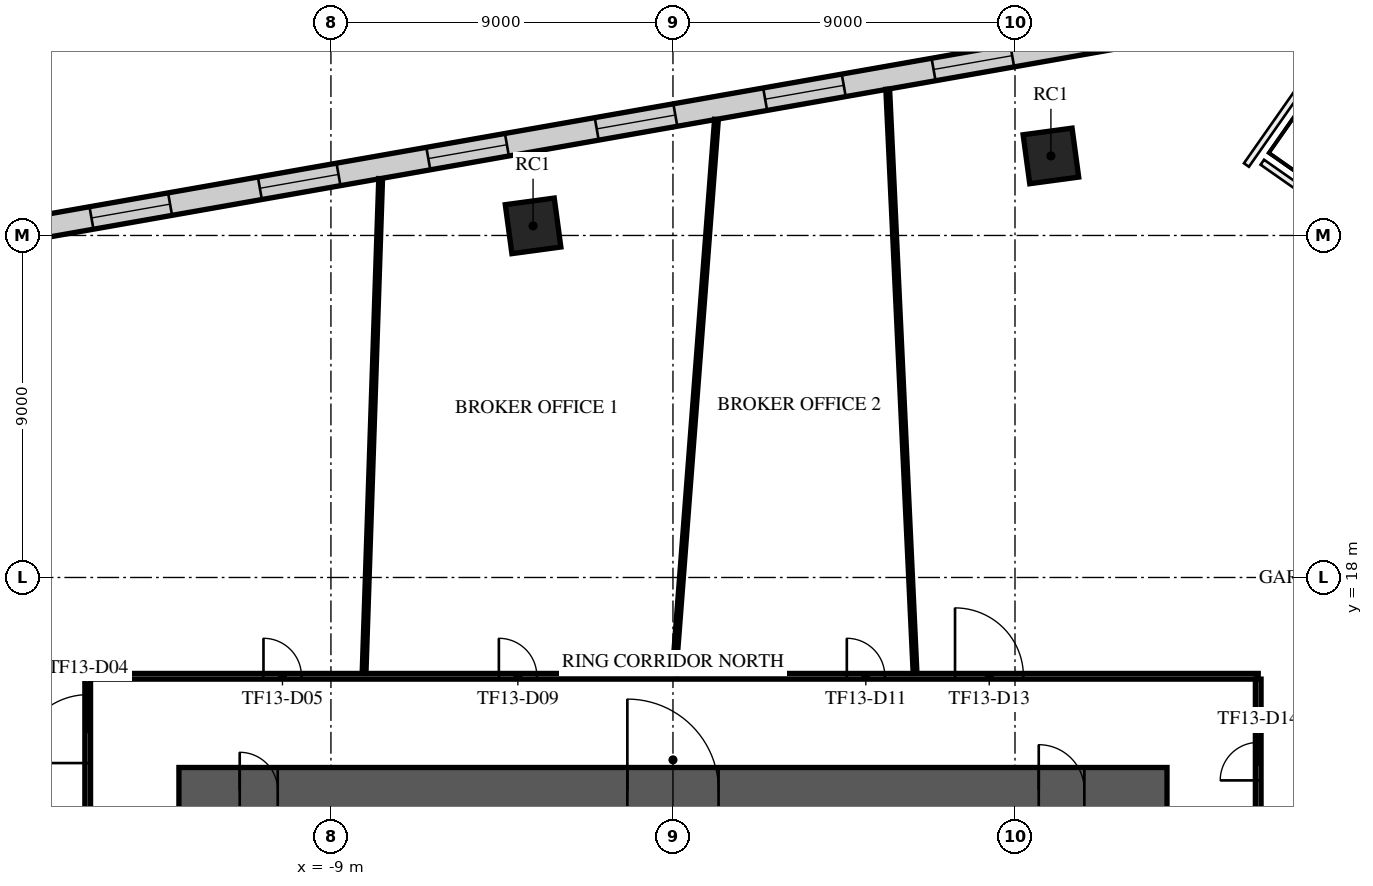
"""IFC4 building model, lengths in metres.
Left out: names, types, materials, properties, quantities, classifications, styles, units other than length and angle.
Written with IfcOpenShell. Run it as: python <this file> out.ifc"""

import sys

from ifc_helpers import new_model, si_unit, direction, frame, frame_2d, origin, origin_2d, place, context, subcontext, project, spatial, rectangle, extrude, element, fill, save


model = new_model("IFC4")
c1 = context("Model", 3, precision=1e-05, world=origin(), true_north=direction((0.0, 1.0)))
c2 = subcontext(c1, "Body", "Model", "MODEL_VIEW")
j1 = project(units=[si_unit("LENGTHUNIT", "METRE"), si_unit("PLANEANGLEUNIT", "RADIAN")], contexts=[c1])
p1 = place(None, origin())
s1 = spatial("IfcSite", under=j1, at=p1, CompositionType="ELEMENT")
p2 = place(p1, origin())
s2 = spatial("IfcBuilding", under=s1, at=p2, CompositionType="ELEMENT")
p3 = place(p2, frame((0.0, 0.0, 59.7)))
s3 = spatial("IfcBuildingStorey", under=s2, at=p3, CompositionType="ELEMENT", Elevation=59.7)
for number, where, z_axis, x_axis in (
    (1, (9.945, 29.093, 0.0), (0.0, 0.0, 1.0), (0.991, 0.134, 0.0)),
    (2, (-3.681, 27.253, 0.0), (0.0, 0.0, 1.0), (0.991, 0.134, 0.0)),
):
    element("IfcColumn", number, at=place(p3, frame(where, z_axis=z_axis, x_axis=x_axis)), inside=s3, PredefinedType="COLUMN", context=c2, shape_type="SweptSolid", body=[
        extrude(rectangle(XDim=1.3, YDim=1.3, at=origin_2d()), origin(), (0.0, 0.0, 1.0), 4.2),
    ])
p4 = place(p3, frame((-13.0, 12.4, 0.0), z_axis=(0.0, 0.0, 1.0), x_axis=(1.0, 0.0, 0.0)))
e3 = element("IfcWall", 3, at=p4, inside=s3, PredefinedType="SHEAR", context=c2, shape_type="SweptSolid", body=[
    extrude(rectangle(XDim=26.0, YDim=1.2, at=frame_2d((13.0, 0.0))), origin(), (0.0, 0.0, 1.0), 3.75),
])
p5 = place(p4, frame((11.8, 0.0, 0.0)))
e4 = element("IfcOpeningElement", 4, at=p5, cuts=e3, PredefinedType="OPENING", context=c2, shape_type="SweptSolid", body=[
    extrude(rectangle(XDim=2.4, YDim=2.4, at=frame_2d((1.2, 1.2))), frame((0.0, 0.61, 0.0), z_axis=(0.0, -1.0, 0.0), x_axis=(1.0, 0.0, 0.0)), (0.0, 0.0, 1.0), 1.22),
])
p6 = place(p4, frame((22.625, 0.0, 0.0)))
e5 = element("IfcOpeningElement", 5, at=p6, cuts=e3, PredefinedType="OPENING", context=c2, shape_type="SweptSolid", body=[
    extrude(rectangle(XDim=1.2, YDim=2.1, at=frame_2d((0.6, 1.05))), frame((0.0, 0.61, 0.0), z_axis=(0.0, -1.0, 0.0), x_axis=(1.0, 0.0, 0.0)), (0.0, 0.0, 1.0), 1.22),
])
p7 = place(p4, frame((1.6, 0.0, 0.0)))
e6 = element("IfcOpeningElement", 6, at=p7, cuts=e3, PredefinedType="OPENING", context=c2, shape_type="SweptSolid", body=[
    extrude(rectangle(XDim=1.0, YDim=2.1, at=frame_2d((0.5, 1.05))), frame((0.0, 0.61, 0.0), z_axis=(0.0, -1.0, 0.0), x_axis=(1.0, 0.0, 0.0)), (0.0, 0.0, 1.0), 1.22),
])
p8 = place(p3, frame((18.97, 33.503, 0.0), z_axis=(0.0, 0.0, 1.0), x_axis=(-0.984807939945, -0.173647117517, 0.0)))
e7 = element("IfcWall", 7, at=p8, inside=s3, PredefinedType="STANDARD", context=c2, shape_type="SweptSolid", body=[
    extrude(rectangle(XDim=49.376, YDim=0.6, at=frame_2d((24.688, 0.0))), origin(), (0.0, 0.0, 1.0), 3.75),
])
p9 = place(p8, frame((1.2, 0.0, 0.9)))
e8 = element("IfcOpeningElement", 8, at=p9, cuts=e7, PredefinedType="OPENING", context=c2, shape_type="SweptSolid", body=[
    extrude(rectangle(XDim=2.1, YDim=2.1, at=frame_2d((1.05, 1.05))), frame((0.0, 0.31, 0.0), z_axis=(0.0, -1.0, 0.0), x_axis=(1.0, 0.0, 0.0)), (0.0, 0.0, 1.0), 0.62),
])
p10 = place(p8, frame((5.7, 0.0, 0.9)))
e9 = element("IfcOpeningElement", 9, at=p10, cuts=e7, PredefinedType="OPENING", context=c2, shape_type="SweptSolid", body=[
    extrude(rectangle(XDim=2.1, YDim=2.1, at=frame_2d((1.05, 1.05))), frame((0.0, 0.31, 0.0), z_axis=(0.0, -1.0, 0.0), x_axis=(1.0, 0.0, 0.0)), (0.0, 0.0, 1.0), 0.62),
])
p11 = place(p8, frame((10.2, 0.0, 0.9)))
e10 = element("IfcOpeningElement", 10, at=p11, cuts=e7, PredefinedType="OPENING", context=c2, shape_type="SweptSolid", body=[
    extrude(rectangle(XDim=2.1, YDim=2.1, at=frame_2d((1.05, 1.05))), frame((0.0, 0.31, 0.0), z_axis=(0.0, -1.0, 0.0), x_axis=(1.0, 0.0, 0.0)), (0.0, 0.0, 1.0), 0.62),
])
p12 = place(p8, frame((14.7, 0.0, 0.9)))
e11 = element("IfcOpeningElement", 11, at=p12, cuts=e7, PredefinedType="OPENING", context=c2, shape_type="SweptSolid", body=[
    extrude(rectangle(XDim=2.1, YDim=2.1, at=frame_2d((1.05, 1.05))), frame((0.0, 0.31, 0.0), z_axis=(0.0, -1.0, 0.0), x_axis=(1.0, 0.0, 0.0)), (0.0, 0.0, 1.0), 0.62),
])
p13 = place(p8, frame((19.2, 0.0, 0.9)))
e12 = element("IfcOpeningElement", 12, at=p13, cuts=e7, PredefinedType="OPENING", context=c2, shape_type="SweptSolid", body=[
    extrude(rectangle(XDim=2.1, YDim=2.1, at=frame_2d((1.05, 1.05))), frame((0.0, 0.31, 0.0), z_axis=(0.0, -1.0, 0.0), x_axis=(1.0, 0.0, 0.0)), (0.0, 0.0, 1.0), 0.62),
])
p14 = place(p8, frame((23.7, 0.0, 0.9)))
e13 = element("IfcOpeningElement", 13, at=p14, cuts=e7, PredefinedType="OPENING", context=c2, shape_type="SweptSolid", body=[
    extrude(rectangle(XDim=2.1, YDim=2.1, at=frame_2d((1.05, 1.05))), frame((0.0, 0.31, 0.0), z_axis=(0.0, -1.0, 0.0), x_axis=(1.0, 0.0, 0.0)), (0.0, 0.0, 1.0), 0.62),
])
p15 = place(p8, frame((28.2, 0.0, 0.9)))
e14 = element("IfcOpeningElement", 14, at=p15, cuts=e7, PredefinedType="OPENING", context=c2, shape_type="SweptSolid", body=[
    extrude(rectangle(XDim=2.1, YDim=2.1, at=frame_2d((1.05, 1.05))), frame((0.0, 0.31, 0.0), z_axis=(0.0, -1.0, 0.0), x_axis=(1.0, 0.0, 0.0)), (0.0, 0.0, 1.0), 0.62),
])
p16 = place(p8, frame((32.7, 0.0, 0.9)))
e15 = element("IfcOpeningElement", 15, at=p16, cuts=e7, PredefinedType="OPENING", context=c2, shape_type="SweptSolid", body=[
    extrude(rectangle(XDim=2.1, YDim=2.1, at=frame_2d((1.05, 1.05))), frame((0.0, 0.31, 0.0), z_axis=(0.0, -1.0, 0.0), x_axis=(1.0, 0.0, 0.0)), (0.0, 0.0, 1.0), 0.62),
])
p17 = place(p8, frame((37.2, 0.0, 0.9)))
e16 = element("IfcOpeningElement", 16, at=p17, cuts=e7, PredefinedType="OPENING", context=c2, shape_type="SweptSolid", body=[
    extrude(rectangle(XDim=2.1, YDim=2.1, at=frame_2d((1.05, 1.05))), frame((0.0, 0.31, 0.0), z_axis=(0.0, -1.0, 0.0), x_axis=(1.0, 0.0, 0.0)), (0.0, 0.0, 1.0), 0.62),
])
p18 = place(p8, frame((41.7, 0.0, 0.9)))
e17 = element("IfcOpeningElement", 17, at=p18, cuts=e7, PredefinedType="OPENING", context=c2, shape_type="SweptSolid", body=[
    extrude(rectangle(XDim=2.1, YDim=2.1, at=frame_2d((1.05, 1.05))), frame((0.0, 0.31, 0.0), z_axis=(0.0, -1.0, 0.0), x_axis=(1.0, 0.0, 0.0)), (0.0, 0.0, 1.0), 0.62),
])
p19 = place(p8, frame((46.138, 0.0, 0.9)))
e18 = element("IfcOpeningElement", 18, at=p19, cuts=e7, PredefinedType="OPENING", context=c2, shape_type="SweptSolid", body=[
    extrude(rectangle(XDim=2.1, YDim=2.1, at=frame_2d((1.05, 1.05))), frame((0.0, 0.31, 0.0), z_axis=(0.0, -1.0, 0.0), x_axis=(1.0, 0.0, 0.0)), (0.0, 0.0, 1.0), 0.62),
])
p20 = place(p3, frame((-15.4, -15.4, 0.0), z_axis=(0.0, 0.0, 1.0), x_axis=(0.0, 1.0, 0.0)))
e19 = element("IfcWall", 19, at=p20, inside=s3, PredefinedType="PARTITIONING", context=c2, shape_type="SweptSolid", body=[
    extrude(rectangle(XDim=30.8, YDim=0.15, at=frame_2d((15.4, 0.0))), origin(), (0.0, 0.0, 1.0), 3.25),
])
p21 = place(p20, frame((21.408, 0.0, 0.0)))
e20 = element("IfcOpeningElement", 20, at=p21, cuts=e19, PredefinedType="OPENING", context=c2, shape_type="SweptSolid", body=[
    extrude(rectangle(XDim=1.8, YDim=2.1, at=frame_2d((0.9, 1.05))), frame((0.0, 0.085, 0.0), z_axis=(0.0, -1.0, 0.0), x_axis=(1.0, 0.0, 0.0)), (0.0, 0.0, 1.0), 0.17),
])
p22 = place(p20, frame((17.158, 0.0, 0.0)))
e21 = element("IfcOpeningElement", 21, at=p22, cuts=e19, PredefinedType="OPENING", context=c2, shape_type="SweptSolid", body=[
    extrude(rectangle(XDim=1.0, YDim=2.1, at=frame_2d((0.5, 1.05))), frame((0.0, 0.085, 0.0), z_axis=(0.0, -1.0, 0.0), x_axis=(1.0, 0.0, 0.0)), (0.0, 0.0, 1.0), 0.17),
])
p23 = place(p20, frame((8.316, 0.0, 0.0)))
e22 = element("IfcOpeningElement", 22, at=p23, cuts=e19, PredefinedType="OPENING", context=c2, shape_type="SweptSolid", body=[
    extrude(rectangle(XDim=1.0, YDim=2.1, at=frame_2d((0.5, 1.05))), frame((0.0, 0.085, 0.0), z_axis=(0.0, -1.0, 0.0), x_axis=(1.0, 0.0, 0.0)), (0.0, 0.0, 1.0), 0.17),
])
p24 = place(p20, frame((28.516, 0.0, 0.0)))
e23 = element("IfcOpeningElement", 23, at=p24, cuts=e19, PredefinedType="OPENING", context=c2, shape_type="SweptSolid", body=[
    extrude(rectangle(XDim=1.8, YDim=2.1, at=frame_2d((0.9, 1.05))), frame((0.0, 0.085, 0.0), z_axis=(0.0, -1.0, 0.0), x_axis=(1.0, 0.0, 0.0)), (0.0, 0.0, 1.0), 0.17),
])
p25 = place(p20, frame((2.8, 0.0, 0.0)))
e24 = element("IfcOpeningElement", 24, at=p25, cuts=e19, PredefinedType="OPENING", context=c2, shape_type="SweptSolid", body=[
    extrude(rectangle(XDim=1.0, YDim=2.1, at=frame_2d((0.5, 1.05))), frame((0.0, 0.085, 0.0), z_axis=(0.0, -1.0, 0.0), x_axis=(1.0, 0.0, 0.0)), (0.0, 0.0, 1.0), 0.17),
])
p26 = place(p3, frame((-15.325, 15.4, 0.0), z_axis=(0.0, 0.0, 1.0), x_axis=(1.0, 0.0, 0.0)))
e25 = element("IfcWall", 25, at=p26, inside=s3, PredefinedType="PARTITIONING", context=c2, shape_type="SweptSolid", body=[
    extrude(rectangle(XDim=30.725, YDim=0.15, at=frame_2d((15.362, 0.0))), origin(), (0.0, 0.0, 1.0), 3.25),
])
p27 = place(p26, frame((4.55, 0.0, 0.0)))
e26 = element("IfcOpeningElement", 26, at=p27, cuts=e25, PredefinedType="OPENING", context=c2, shape_type="SweptSolid", body=[
    extrude(rectangle(XDim=1.0, YDim=2.1, at=frame_2d((0.5, 1.05))), frame((0.0, 0.085, 0.0), z_axis=(0.0, -1.0, 0.0), x_axis=(1.0, 0.0, 0.0)), (0.0, 0.0, 1.0), 0.17),
])
p28 = place(p26, frame((10.744, 0.0, 0.0)))
e27 = element("IfcOpeningElement", 27, at=p28, cuts=e25, PredefinedType="OPENING", context=c2, shape_type="SweptSolid", body=[
    extrude(rectangle(XDim=1.0, YDim=2.1, at=frame_2d((0.5, 1.05))), frame((0.0, 0.085, 0.0), z_axis=(0.0, -1.0, 0.0), x_axis=(1.0, 0.0, 0.0)), (0.0, 0.0, 1.0), 0.17),
])
p29 = place(p26, frame((19.9, 0.0, 0.0)))
e28 = element("IfcOpeningElement", 28, at=p29, cuts=e25, PredefinedType="OPENING", context=c2, shape_type="SweptSolid", body=[
    extrude(rectangle(XDim=1.0, YDim=2.1, at=frame_2d((0.5, 1.05))), frame((0.0, 0.085, 0.0), z_axis=(0.0, -1.0, 0.0), x_axis=(1.0, 0.0, 0.0)), (0.0, 0.0, 1.0), 0.17),
])
p30 = place(p26, frame((22.747, 0.0, 0.0)))
e29 = element("IfcOpeningElement", 29, at=p30, cuts=e25, PredefinedType="OPENING", context=c2, shape_type="SweptSolid", body=[
    extrude(rectangle(XDim=1.8, YDim=2.1, at=frame_2d((0.9, 1.05))), frame((0.0, 0.085, 0.0), z_axis=(0.0, -1.0, 0.0), x_axis=(1.0, 0.0, 0.0)), (0.0, 0.0, 1.0), 0.17),
])
p31 = place(p3, frame((15.4, -15.325, 0.0), z_axis=(0.0, 0.0, 1.0), x_axis=(0.0, 1.0, 0.0)))
e30 = element("IfcWall", 30, at=p31, inside=s3, PredefinedType="PARTITIONING", context=c2, shape_type="SweptSolid", body=[
    extrude(rectangle(XDim=30.65, YDim=0.15, at=frame_2d((15.325, 0.0))), origin(), (0.0, 0.0, 1.0), 3.25),
])
p32 = place(p31, frame((27.985, 0.0, 0.0)))
e31 = element("IfcOpeningElement", 31, at=p32, cuts=e30, PredefinedType="OPENING", context=c2, shape_type="SweptSolid", body=[
    extrude(rectangle(XDim=1.0, YDim=2.1, at=frame_2d((0.5, 1.05))), frame((0.0, 0.085, 0.0), z_axis=(0.0, -1.0, 0.0), x_axis=(1.0, 0.0, 0.0)), (0.0, 0.0, 1.0), 0.17),
])
p33 = place(p31, frame((3.3, 0.0, 0.0)))
e32 = element("IfcOpeningElement", 32, at=p33, cuts=e30, PredefinedType="OPENING", context=c2, shape_type="SweptSolid", body=[
    extrude(rectangle(XDim=1.0, YDim=2.1, at=frame_2d((0.5, 1.05))), frame((0.0, 0.085, 0.0), z_axis=(0.0, -1.0, 0.0), x_axis=(1.0, 0.0, 0.0)), (0.0, 0.0, 1.0), 0.17),
])
p34 = place(p31, frame((16.538, 0.0, 0.0)))
e33 = element("IfcOpeningElement", 33, at=p34, cuts=e30, PredefinedType="OPENING", context=c2, shape_type="SweptSolid", body=[
    extrude(rectangle(XDim=1.0, YDim=2.1, at=frame_2d((0.5, 1.05))), frame((0.0, 0.085, 0.0), z_axis=(0.0, -1.0, 0.0), x_axis=(1.0, 0.0, 0.0)), (0.0, 0.0, 1.0), 0.17),
])
p35 = place(p31, frame((8.087, 0.0, 0.0)))
e34 = element("IfcOpeningElement", 34, at=p35, cuts=e30, PredefinedType="OPENING", context=c2, shape_type="SweptSolid", body=[
    extrude(rectangle(XDim=1.0, YDim=2.1, at=frame_2d((0.5, 1.05))), frame((0.0, 0.085, 0.0), z_axis=(0.0, -1.0, 0.0), x_axis=(1.0, 0.0, 0.0)), (0.0, 0.0, 1.0), 0.17),
])
p36 = place(p3, frame((-8.128, 15.477, 0.0), z_axis=(0.0, 0.0, 1.0), x_axis=(0.033530755766, 0.99943768611, 0.0)))
e35 = element("IfcWall", 35, at=p36, inside=s3, PredefinedType="PARTITIONING", context=c2, shape_type="SweptSolid", body=[
    extrude(rectangle(XDim=13.026, YDim=0.1, at=frame_2d((6.513, 0.0))), origin(), (0.0, 0.0, 1.0), 2.95),
])
p37 = place(p3, frame((0.031, 15.479, 0.0), z_axis=(0.0, 0.0, 1.0), x_axis=(0.076195813728, 0.997092873292, 0.0)))
e36 = element("IfcWall", 36, at=p37, inside=s3, PredefinedType="PARTITIONING", context=c2, shape_type="SweptSolid", body=[
    extrude(rectangle(XDim=14.617, YDim=0.1, at=frame_2d((7.309, 0.0))), origin(), (0.0, 0.0, 1.0), 2.95),
])
p38 = place(p3, frame((5.651, 30.848, 0.0), z_axis=(0.0, 0.0, 1.0), x_axis=(0.046726123589, -0.998907738169, 0.0)))
e37 = element("IfcWall", 37, at=p38, inside=s3, PredefinedType="PARTITIONING", context=c2, shape_type="SweptSolid", body=[
    extrude(rectangle(XDim=15.387, YDim=0.1, at=frame_2d((7.694, 0.0))), origin(), (0.0, 0.0, 1.0), 2.95),
])
p39 = place(p5, origin())
e38 = element("IfcDoor", 38, at=p39, inside=s3, OperationType="SINGLE_SWING_LEFT", PredefinedType="DOOR", context=c2, shape_type="SweptSolid", body=[
    extrude(rectangle(XDim=2.4, YDim=2.4, at=frame_2d((1.2, 1.2))), frame((0.0, 0.025, 0.0), z_axis=(0.0, -1.0, 0.0), x_axis=(1.0, 0.0, 0.0)), (0.0, 0.0, 1.0), 0.05),
])
fill(e4, e38)
p40 = place(p6, origin())
e39 = element("IfcDoor", 39, at=p40, inside=s3, OperationType="SINGLE_SWING_LEFT", PredefinedType="DOOR", context=c2, shape_type="SweptSolid", body=[
    extrude(rectangle(XDim=1.2, YDim=2.1, at=frame_2d((0.6, 1.05))), frame((0.0, 0.025, 0.0), z_axis=(0.0, -1.0, 0.0), x_axis=(1.0, 0.0, 0.0)), (0.0, 0.0, 1.0), 0.05),
])
fill(e5, e39)
p41 = place(p7, origin())
e40 = element("IfcDoor", 40, at=p41, inside=s3, OperationType="SINGLE_SWING_LEFT", PredefinedType="DOOR", context=c2, shape_type="SweptSolid", body=[
    extrude(rectangle(XDim=1.0, YDim=2.1, at=frame_2d((0.5, 1.05))), frame((0.0, 0.025, 0.0), z_axis=(0.0, -1.0, 0.0), x_axis=(1.0, 0.0, 0.0)), (0.0, 0.0, 1.0), 0.05),
])
fill(e6, e40)
p42 = place(p11, origin())
e41 = element("IfcWindow", 41, at=p42, inside=s3, PartitioningType="SINGLE_PANEL", PredefinedType="WINDOW", context=c2, shape_type="SweptSolid", body=[
    extrude(rectangle(XDim=2.1, YDim=2.1, at=frame_2d((1.05, 1.05))), frame((0.0, 0.03, 0.0), z_axis=(0.0, -1.0, 0.0), x_axis=(1.0, 0.0, 0.0)), (0.0, 0.0, 1.0), 0.06),
])
fill(e10, e41)
p43 = place(p12, origin())
e42 = element("IfcWindow", 42, at=p43, inside=s3, PartitioningType="SINGLE_PANEL", PredefinedType="WINDOW", context=c2, shape_type="SweptSolid", body=[
    extrude(rectangle(XDim=2.1, YDim=2.1, at=frame_2d((1.05, 1.05))), frame((0.0, 0.03, 0.0), z_axis=(0.0, -1.0, 0.0), x_axis=(1.0, 0.0, 0.0)), (0.0, 0.0, 1.0), 0.06),
])
fill(e11, e42)
p44 = place(p13, origin())
e43 = element("IfcWindow", 43, at=p44, inside=s3, PartitioningType="SINGLE_PANEL", PredefinedType="WINDOW", context=c2, shape_type="SweptSolid", body=[
    extrude(rectangle(XDim=2.1, YDim=2.1, at=frame_2d((1.05, 1.05))), frame((0.0, 0.03, 0.0), z_axis=(0.0, -1.0, 0.0), x_axis=(1.0, 0.0, 0.0)), (0.0, 0.0, 1.0), 0.06),
])
fill(e12, e43)
p45 = place(p14, origin())
e44 = element("IfcWindow", 44, at=p45, inside=s3, PartitioningType="SINGLE_PANEL", PredefinedType="WINDOW", context=c2, shape_type="SweptSolid", body=[
    extrude(rectangle(XDim=2.1, YDim=2.1, at=frame_2d((1.05, 1.05))), frame((0.0, 0.03, 0.0), z_axis=(0.0, -1.0, 0.0), x_axis=(1.0, 0.0, 0.0)), (0.0, 0.0, 1.0), 0.06),
])
fill(e13, e44)
p46 = place(p15, origin())
e45 = element("IfcWindow", 45, at=p46, inside=s3, PartitioningType="SINGLE_PANEL", PredefinedType="WINDOW", context=c2, shape_type="SweptSolid", body=[
    extrude(rectangle(XDim=2.1, YDim=2.1, at=frame_2d((1.05, 1.05))), frame((0.0, 0.03, 0.0), z_axis=(0.0, -1.0, 0.0), x_axis=(1.0, 0.0, 0.0)), (0.0, 0.0, 1.0), 0.06),
])
fill(e14, e45)
p47 = place(p16, origin())
e46 = element("IfcWindow", 46, at=p47, inside=s3, PartitioningType="SINGLE_PANEL", PredefinedType="WINDOW", context=c2, shape_type="SweptSolid", body=[
    extrude(rectangle(XDim=2.1, YDim=2.1, at=frame_2d((1.05, 1.05))), frame((0.0, 0.03, 0.0), z_axis=(0.0, -1.0, 0.0), x_axis=(1.0, 0.0, 0.0)), (0.0, 0.0, 1.0), 0.06),
])
fill(e15, e46)
p48 = place(p24, origin())
e47 = element("IfcDoor", 47, at=p48, inside=s3, OperationType="DOUBLE_DOOR_SINGLE_SWING", PredefinedType="DOOR", context=c2, shape_type="SweptSolid", body=[
    extrude(rectangle(XDim=1.8, YDim=2.1, at=frame_2d((0.9, 1.05))), frame((0.0, 0.025, 0.0), z_axis=(0.0, -1.0, 0.0), x_axis=(1.0, 0.0, 0.0)), (0.0, 0.0, 1.0), 0.05),
])
fill(e23, e47)
p49 = place(p27, origin())
e48 = element("IfcDoor", 48, at=p49, inside=s3, OperationType="SINGLE_SWING_LEFT", PredefinedType="DOOR", context=c2, shape_type="SweptSolid", body=[
    extrude(rectangle(XDim=1.0, YDim=2.1, at=frame_2d((0.5, 1.05))), frame((0.0, 0.025, 0.0), z_axis=(0.0, -1.0, 0.0), x_axis=(1.0, 0.0, 0.0)), (0.0, 0.0, 1.0), 0.05),
])
fill(e26, e48)
p50 = place(p28, origin())
e49 = element("IfcDoor", 49, at=p50, inside=s3, OperationType="SINGLE_SWING_RIGHT", PredefinedType="DOOR", context=c2, shape_type="SweptSolid", body=[
    extrude(rectangle(XDim=1.0, YDim=2.1, at=frame_2d((0.5, 1.05))), frame((0.0, 0.025, 0.0), z_axis=(0.0, -1.0, 0.0), x_axis=(1.0, 0.0, 0.0)), (0.0, 0.0, 1.0), 0.05),
])
fill(e27, e49)
p51 = place(p29, origin())
e50 = element("IfcDoor", 50, at=p51, inside=s3, OperationType="SINGLE_SWING_LEFT", PredefinedType="DOOR", context=c2, shape_type="SweptSolid", body=[
    extrude(rectangle(XDim=1.0, YDim=2.1, at=frame_2d((0.5, 1.05))), frame((0.0, 0.025, 0.0), z_axis=(0.0, -1.0, 0.0), x_axis=(1.0, 0.0, 0.0)), (0.0, 0.0, 1.0), 0.05),
])
fill(e28, e50)
p52 = place(p30, origin())
e51 = element("IfcDoor", 51, at=p52, inside=s3, OperationType="DOUBLE_DOOR_SINGLE_SWING", PredefinedType="DOOR", context=c2, shape_type="SweptSolid", body=[
    extrude(rectangle(XDim=1.8, YDim=2.1, at=frame_2d((0.9, 1.05))), frame((0.0, 0.025, 0.0), z_axis=(0.0, -1.0, 0.0), x_axis=(1.0, 0.0, 0.0)), (0.0, 0.0, 1.0), 0.05),
])
fill(e29, e51)
p53 = place(p32, frame((1.0, 0.0, 0.0), z_axis=(0.0, 0.0, 1.0), x_axis=(-1.0, 0.0, 0.0)))
e52 = element("IfcDoor", 52, at=p53, inside=s3, OperationType="SINGLE_SWING_LEFT", PredefinedType="DOOR", context=c2, shape_type="SweptSolid", body=[
    extrude(rectangle(XDim=1.0, YDim=2.1, at=frame_2d((0.5, 1.05))), frame((0.0, 0.025, 0.0), z_axis=(0.0, -1.0, 0.0), x_axis=(1.0, 0.0, 0.0)), (0.0, 0.0, 1.0), 0.05),
])
fill(e31, e52)
save(model, sys.argv[1])
